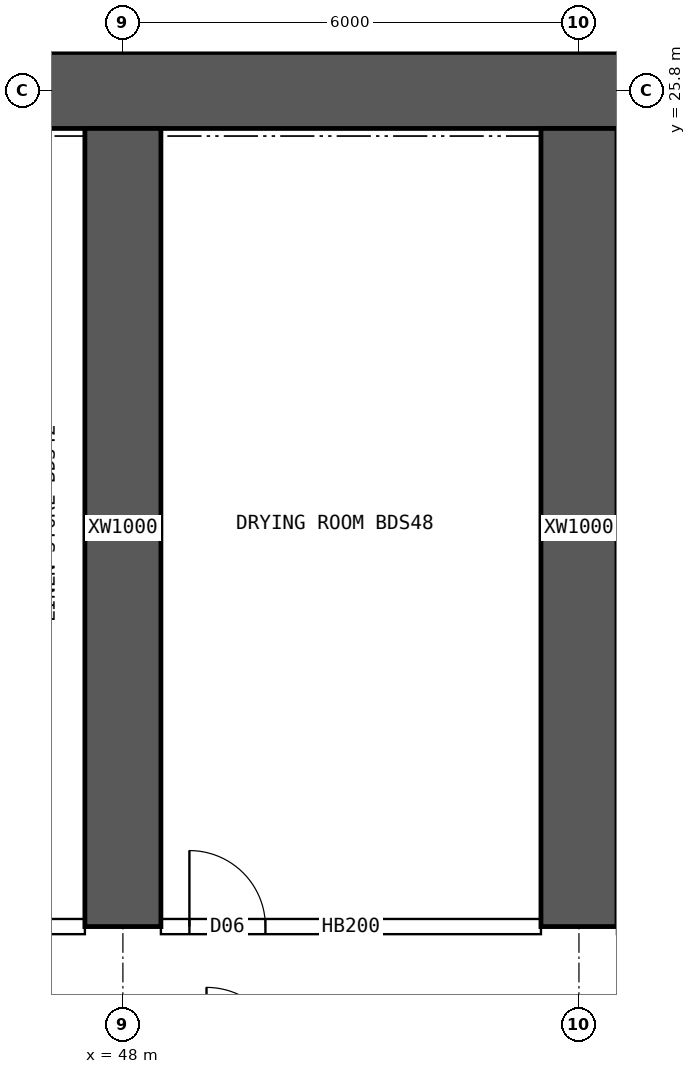
"""IFC4 building model, lengths in metres.
Left out: names, types, materials, properties, quantities, classifications, styles, units other than length and angle.
Written with IfcOpenShell. Run it as: python <this file> out.ifc"""

import sys

from ifc_helpers import new_model, si_unit, direction, frame, frame_2d, origin, place, context, subcontext, project, spatial, rectangle, extrude, element, fill, save


model = new_model("IFC4")
c1 = context("Model", 3, precision=1e-05, world=origin(), true_north=direction((0.0, 1.0)))
c2 = subcontext(c1, "Body", "Model", "MODEL_VIEW")
j1 = project(units=[si_unit("LENGTHUNIT", "METRE"), si_unit("PLANEANGLEUNIT", "RADIAN")], contexts=[c1])
p1 = place(None, origin())
s1 = spatial("IfcSite", under=j1, at=p1, CompositionType="ELEMENT")
p2 = place(p1, origin())
s2 = spatial("IfcBuilding", under=s1, at=p2, CompositionType="ELEMENT")
p3 = place(p2, frame((0.0, 0.0, 46.45)))
s3 = spatial("IfcBuildingStorey", under=s2, at=p3, CompositionType="ELEMENT", Elevation=46.45)
p4 = place(p3, frame((18.0, 25.8, 0.0), z_axis=(0.0, 0.0, 1.0), x_axis=(1.0, 0.0, 0.0)))
e1 = element("IfcWall", 1, at=p4, inside=s3, PredefinedType="SHEAR", context=c2, shape_type="SweptSolid", body=[
    extrude(rectangle(XDim=48.0, YDim=1.0, at=frame_2d((24.0, 0.0))), origin(), (0.0, 0.0, 1.0), 3.75),
])
for number, where, z_axis, x_axis in (
    (2, (48.0, 14.8, 0.0), (0.0, 0.0, 1.0), (0.0, 1.0, 0.0)),
    (3, (54.0, 14.8, 0.0), (0.0, 0.0, 1.0), (0.0, 1.0, 0.0)),
):
    element("IfcWall", number, at=place(p3, frame(where, z_axis=z_axis, x_axis=x_axis)), inside=s3, PredefinedType="SHEAR", context=c2, shape_type="SweptSolid", body=[
        extrude(rectangle(XDim=10.5, YDim=1.0, at=frame_2d((5.25, 0.0))), origin(), (0.0, 0.0, 1.0), 3.75),
    ])
p5 = place(p3, frame((42.5, 14.8, 0.0), z_axis=(0.0, 0.0, 1.0), x_axis=(1.0, 0.0, 0.0)))
e4 = element("IfcWall", 4, at=p5, inside=s3, PredefinedType="SOLIDWALL", context=c2, shape_type="SweptSolid", body=[
    extrude(rectangle(XDim=5.0, YDim=0.2, at=frame_2d((2.5, 0.0))), origin(), (0.0, 0.0, 1.0), 3.5),
])
p6 = place(p5, frame((0.35, 0.0, 0.0)))
e5 = element("IfcOpeningElement", 5, at=p6, cuts=e4, PredefinedType="OPENING", context=c2, shape_type="SweptSolid", body=[
    extrude(rectangle(XDim=0.9, YDim=2.1, at=frame_2d((0.45, 1.05))), frame((0.0, 0.11, 0.0), z_axis=(0.0, -1.0, 0.0), x_axis=(1.0, 0.0, 0.0)), (0.0, 0.0, 1.0), 0.22),
])
p7 = place(p5, frame((3.405, 0.0, 0.0)))
e6 = element("IfcOpeningElement", 6, at=p7, cuts=e4, PredefinedType="OPENING", context=c2, shape_type="SweptSolid", body=[
    extrude(rectangle(XDim=0.9, YDim=2.1, at=frame_2d((0.45, 1.05))), frame((0.0, 0.11, 0.0), z_axis=(0.0, -1.0, 0.0), x_axis=(1.0, 0.0, 0.0)), (0.0, 0.0, 1.0), 0.22),
])
p8 = place(p3, frame((48.5, 14.8, 0.0), z_axis=(0.0, 0.0, 1.0), x_axis=(1.0, 0.0, 0.0)))
e7 = element("IfcWall", 7, at=p8, inside=s3, PredefinedType="SOLIDWALL", context=c2, shape_type="SweptSolid", body=[
    extrude(rectangle(XDim=5.0, YDim=0.2, at=frame_2d((2.5, 0.0))), origin(), (0.0, 0.0, 1.0), 3.5),
])
p9 = place(p8, frame((0.375, 0.0, 0.0)))
e8 = element("IfcOpeningElement", 8, at=p9, cuts=e7, PredefinedType="OPENING", context=c2, shape_type="SweptSolid", body=[
    extrude(rectangle(XDim=1.0, YDim=2.1, at=frame_2d((0.5, 1.05))), frame((0.0, 0.11, 0.0), z_axis=(0.0, -1.0, 0.0), x_axis=(1.0, 0.0, 0.0)), (0.0, 0.0, 1.0), 0.22),
])
p10 = place(p9, origin())
e9 = element("IfcDoor", 9, at=p10, inside=s3, OperationType="SINGLE_SWING_LEFT", PredefinedType="DOOR", context=c2, shape_type="SweptSolid", body=[
    extrude(rectangle(XDim=1.0, YDim=2.1, at=frame_2d((0.5, 1.05))), frame((0.0, 0.025, 0.0), z_axis=(0.0, -1.0, 0.0), x_axis=(1.0, 0.0, 0.0)), (0.0, 0.0, 1.0), 0.05),
])
fill(e8, e9)
save(model, sys.argv[1])
